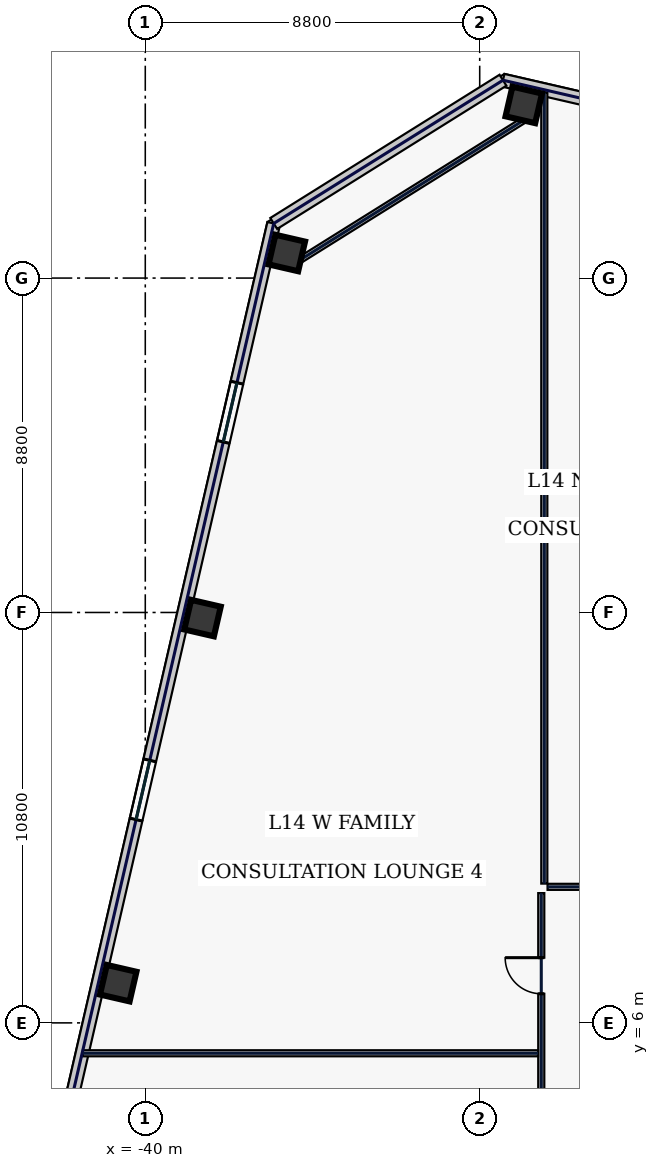
"""IFC4 building model, lengths in metres.
Left out: names, types, materials, properties, quantities, classifications, styles, units other than length and angle.
Written with IfcOpenShell. Run it as: python <this file> out.ifc"""

import sys

from ifc_helpers import new_model, si_unit, direction, frame, frame_2d, origin, origin_2d, place, context, subcontext, project, spatial, rectangle, hollow_rectangle, extrude, element, fill, save


model = new_model("IFC4")
c1 = context("Model", 3, precision=1e-05, world=origin(), true_north=direction((0.0, 1.0)))
c2 = subcontext(c1, "Body", "Model", "MODEL_VIEW")
j1 = project(units=[si_unit("LENGTHUNIT", "METRE"), si_unit("PLANEANGLEUNIT", "RADIAN")], contexts=[c1])
p1 = place(None, origin())
s1 = spatial("IfcSite", under=j1, at=p1, CompositionType="ELEMENT")
p2 = place(p1, origin())
s2 = spatial("IfcBuilding", under=s1, at=p2, CompositionType="ELEMENT")
p3 = place(p2, frame((0.0, 0.0, 67.4)))
s3 = spatial("IfcBuildingStorey", under=s2, at=p3, CompositionType="ELEMENT", Elevation=67.4)
for number, where, z_axis, x_axis in (
    (1, (-30.04, 30.156, 0.0), (0.0, 0.0, 1.0), (0.974, -0.225, 0.0)),
    (2, (-36.276, 26.26, 0.0), (0.0, 0.0, 1.0), (0.974, -0.225, 0.0)),
    (3, (-38.494, 16.652, 0.0), (0.0, 0.0, 1.0), (0.974, -0.225, 0.0)),
    (4, (-40.712, 7.045, 0.0), (0.0, 0.0, 1.0), (0.974, -0.225, 0.0)),
):
    element("IfcColumn", number, at=place(p3, frame(where, z_axis=z_axis, x_axis=x_axis)), inside=s3, PredefinedType="COLUMN", context=c2, shape_type="SweptSolid", body=[
        extrude(hollow_rectangle(XDim=0.8, YDim=0.8, WallThickness=0.036, at=origin_2d()), origin(), (0.0, 0.0, 1.0), 3.74),
    ])
p4 = place(p3, frame((-8.517, 25.711, 0.0), z_axis=(0.0, 0.0, 1.0), x_axis=(-0.974372845456, 0.224939009598, 0.0)))
e5 = element("IfcWall", 5, at=p4, inside=s3, PredefinedType="STANDARD", context=c2, shape_type="SweptSolid", body=[
    extrude(rectangle(XDim=22.652, YDim=0.34, at=frame_2d((11.326, 0.0))), origin(), (0.0, 0.0, 1.0), 3.74),
])
p5 = place(p4, frame((18.189, 0.0, 0.77)))
e6 = element("IfcOpeningElement", 6, at=p5, cuts=e5, PredefinedType="OPENING", context=c2, shape_type="SweptSolid", body=[
    extrude(rectangle(XDim=2.3, YDim=2.1, at=frame_2d((1.15, 1.05))), frame((0.0, 0.18, 0.0), z_axis=(0.0, -1.0, 0.0), x_axis=(1.0, 0.0, 0.0)), (0.0, 0.0, 1.0), 0.36),
])
p6 = place(p4, frame((13.705, 0.0, 0.77)))
e7 = element("IfcOpeningElement", 7, at=p6, cuts=e5, PredefinedType="OPENING", context=c2, shape_type="SweptSolid", body=[
    extrude(rectangle(XDim=0.85, YDim=1.85, at=frame_2d((0.425, 0.925))), frame((0.0, 0.18, 0.0), z_axis=(0.0, -1.0, 0.0), x_axis=(1.0, 0.0, 0.0)), (0.0, 0.0, 1.0), 0.36),
])
p7 = place(p4, frame((5.406, 0.0, 0.77)))
e8 = element("IfcOpeningElement", 8, at=p7, cuts=e5, PredefinedType="OPENING", context=c2, shape_type="SweptSolid", body=[
    extrude(rectangle(XDim=0.85, YDim=1.85, at=frame_2d((0.425, 0.925))), frame((0.0, 0.18, 0.0), z_axis=(0.0, -1.0, 0.0), x_axis=(1.0, 0.0, 0.0)), (0.0, 0.0, 1.0), 0.36),
])
p8 = place(p3, frame((-36.62, 27.037, 0.0), z_axis=(0.0, 0.0, 1.0), x_axis=(-0.224951280646, -0.974370012539, 0.0)))
e9 = element("IfcWall", 9, at=p8, inside=s3, PredefinedType="STANDARD", context=c2, shape_type="SweptSolid", body=[
    extrude(rectangle(XDim=40.8, YDim=0.34, at=frame_2d((20.4, 0.0))), origin(), (0.0, 0.0, 1.0), 3.74),
])
p9 = place(p8, frame((4.3, 0.0, 0.58)))
e10 = element("IfcOpeningElement", 10, at=p9, cuts=e9, PredefinedType="OPENING", context=c2, shape_type="SweptSolid", body=[
    extrude(rectangle(XDim=1.6, YDim=2.3, at=frame_2d((0.8, 1.15))), frame((0.0, 0.18, 0.0), z_axis=(0.0, -1.0, 0.0), x_axis=(1.0, 0.0, 0.0)), (0.0, 0.0, 1.0), 0.36),
])
p10 = place(p8, frame((14.5, 0.0, 0.58)))
e11 = element("IfcOpeningElement", 11, at=p10, cuts=e9, PredefinedType="OPENING", context=c2, shape_type="SweptSolid", body=[
    extrude(rectangle(XDim=1.6, YDim=2.3, at=frame_2d((0.8, 1.15))), frame((0.0, 0.18, 0.0), z_axis=(0.0, -1.0, 0.0), x_axis=(1.0, 0.0, 0.0)), (0.0, 0.0, 1.0), 0.36),
])
p11 = place(p8, frame((24.35, 0.0, 0.75)))
e12 = element("IfcOpeningElement", 12, at=p11, cuts=e9, PredefinedType="OPENING", context=c2, shape_type="SweptSolid", body=[
    extrude(rectangle(XDim=0.85, YDim=1.85, at=frame_2d((0.425, 0.925))), frame((0.0, 0.18, 0.0), z_axis=(0.0, -1.0, 0.0), x_axis=(1.0, 0.0, 0.0)), (0.0, 0.0, 1.0), 0.36),
])
p12 = place(p8, frame((34.9, 0.0, 0.58)))
e13 = element("IfcOpeningElement", 13, at=p12, cuts=e9, PredefinedType="OPENING", context=c2, shape_type="SweptSolid", body=[
    extrude(rectangle(XDim=1.6, YDim=2.3, at=frame_2d((0.8, 1.15))), frame((0.0, 0.18, 0.0), z_axis=(0.0, -1.0, 0.0), x_axis=(1.0, 0.0, 0.0)), (0.0, 0.0, 1.0), 0.36),
])
p13 = place(p3, frame((-30.588, 30.807, 0.0), z_axis=(0.0, 0.0, 1.0), x_axis=(-0.848031080615, -0.529946493819, 0.0)))
e14 = element("IfcWall", 14, at=p13, inside=s3, PredefinedType="STANDARD", context=c2, shape_type="SweptSolid", body=[
    extrude(rectangle(XDim=7.114, YDim=0.34, at=frame_2d((3.557, 0.0))), origin(), (0.0, 0.0, 1.0), 3.74),
])
p14 = place(p3, frame((-29.86, 29.868, 0.0), z_axis=(0.0, 0.0, 1.0), x_axis=(-0.848043064089, -0.529927317139, 0.0)))
e15 = element("IfcWall", 15, at=p14, inside=s3, PredefinedType="PARTITIONING", context=c2, shape_type="SweptSolid", body=[
    extrude(rectangle(XDim=7.354, YDim=0.16, at=frame_2d((3.677, 0.0))), origin(), (0.0, 0.0, 1.0), 3.74),
])
p15 = place(p3, frame((-29.58, -9.215, 0.0), z_axis=(0.0, 0.0, 1.0), x_axis=(0.0, 1.0, 0.0)))
e16 = element("IfcWall", 16, at=p15, inside=s3, PredefinedType="PARTITIONING", context=c2, shape_type="SweptSolid", body=[
    extrude(rectangle(XDim=18.63, YDim=0.16, at=frame_2d((9.315, 0.0))), origin(), (0.0, 0.0, 1.0), 3.74),
])
p16 = place(p15, frame((1.769, 0.0, 0.0)))
e17 = element("IfcOpeningElement", 17, at=p16, cuts=e16, PredefinedType="OPENING", context=c2, shape_type="SweptSolid", body=[
    extrude(rectangle(XDim=0.95, YDim=2.2, at=frame_2d((0.475, 1.1))), frame((0.0, 0.09, 0.0), z_axis=(0.0, -1.0, 0.0), x_axis=(1.0, 0.0, 0.0)), (0.0, 0.0, 1.0), 0.18),
])
p17 = place(p15, frame((6.85, 0.0, 0.0)))
e18 = element("IfcOpeningElement", 18, at=p17, cuts=e16, PredefinedType="OPENING", context=c2, shape_type="SweptSolid", body=[
    extrude(rectangle(XDim=0.95, YDim=2.2, at=frame_2d((0.475, 1.1))), frame((0.0, 0.09, 0.0), z_axis=(0.0, -1.0, 0.0), x_axis=(1.0, 0.0, 0.0)), (0.0, 0.0, 1.0), 0.18),
])
p18 = place(p15, frame((12.05, 0.0, 0.0)))
e19 = element("IfcOpeningElement", 19, at=p18, cuts=e16, PredefinedType="OPENING", context=c2, shape_type="SweptSolid", body=[
    extrude(rectangle(XDim=0.95, YDim=2.2, at=frame_2d((0.475, 1.1))), frame((0.0, 0.09, 0.0), z_axis=(0.0, -1.0, 0.0), x_axis=(1.0, 0.0, 0.0)), (0.0, 0.0, 1.0), 0.18),
])
p19 = place(p15, frame((15.981, 0.0, 0.0)))
e20 = element("IfcOpeningElement", 20, at=p19, cuts=e16, PredefinedType="OPENING", context=c2, shape_type="SweptSolid", body=[
    extrude(rectangle(XDim=0.95, YDim=2.2, at=frame_2d((0.475, 1.1))), frame((0.0, 0.09, 0.0), z_axis=(0.0, -1.0, 0.0), x_axis=(1.0, 0.0, 0.0)), (0.0, 0.0, 1.0), 0.18),
])
p20 = place(p3, frame((-29.415, 9.58, 0.0), z_axis=(0.0, 0.0, 1.0), x_axis=(1.0, 0.0, 0.0)))
e21 = element("IfcWall", 21, at=p20, inside=s3, PredefinedType="PARTITIONING", context=c2, shape_type="SweptSolid", body=[
    extrude(rectangle(XDim=43.65, YDim=0.16, at=frame_2d((21.825, 0.0))), origin(), (0.0, 0.0, 1.0), 3.74),
])
p21 = place(p20, frame((2.469, 0.0, 0.0)))
e22 = element("IfcOpeningElement", 22, at=p21, cuts=e21, PredefinedType="OPENING", context=c2, shape_type="SweptSolid", body=[
    extrude(rectangle(XDim=1.05, YDim=2.2, at=frame_2d((0.525, 1.1))), frame((0.0, 0.09, 0.0), z_axis=(0.0, -1.0, 0.0), x_axis=(1.0, 0.0, 0.0)), (0.0, 0.0, 1.0), 0.18),
])
p22 = place(p20, frame((8.2, 0.0, 0.0)))
e23 = element("IfcOpeningElement", 23, at=p22, cuts=e21, PredefinedType="OPENING", context=c2, shape_type="SweptSolid", body=[
    extrude(rectangle(XDim=0.95, YDim=2.2, at=frame_2d((0.475, 1.1))), frame((0.0, 0.09, 0.0), z_axis=(0.0, -1.0, 0.0), x_axis=(1.0, 0.0, 0.0)), (0.0, 0.0, 1.0), 0.18),
])
p23 = place(p20, frame((14.1, 0.0, 0.0)))
e24 = element("IfcOpeningElement", 24, at=p23, cuts=e21, PredefinedType="OPENING", context=c2, shape_type="SweptSolid", body=[
    extrude(rectangle(XDim=0.95, YDim=2.2, at=frame_2d((0.475, 1.1))), frame((0.0, 0.09, 0.0), z_axis=(0.0, -1.0, 0.0), x_axis=(1.0, 0.0, 0.0)), (0.0, 0.0, 1.0), 0.18),
])
p24 = place(p20, frame((20.275, 0.0, 0.0)))
e25 = element("IfcOpeningElement", 25, at=p24, cuts=e21, PredefinedType="OPENING", context=c2, shape_type="SweptSolid", body=[
    extrude(rectangle(XDim=1.3, YDim=2.2, at=frame_2d((0.65, 1.1))), frame((0.0, 0.09, 0.0), z_axis=(0.0, -1.0, 0.0), x_axis=(1.0, 0.0, 0.0)), (0.0, 0.0, 1.0), 0.18),
])
p25 = place(p20, frame((27.075, 0.0, 0.0)))
e26 = element("IfcOpeningElement", 26, at=p25, cuts=e21, PredefinedType="OPENING", context=c2, shape_type="SweptSolid", body=[
    extrude(rectangle(XDim=1.3, YDim=2.2, at=frame_2d((0.65, 1.1))), frame((0.0, 0.09, 0.0), z_axis=(0.0, -1.0, 0.0), x_axis=(1.0, 0.0, 0.0)), (0.0, 0.0, 1.0), 0.18),
])
p26 = place(p20, frame((34.906, 0.0, 0.0)))
e27 = element("IfcOpeningElement", 27, at=p26, cuts=e21, PredefinedType="OPENING", context=c2, shape_type="SweptSolid", body=[
    extrude(rectangle(XDim=1.45, YDim=2.2, at=frame_2d((0.725, 1.1))), frame((0.0, 0.09, 0.0), z_axis=(0.0, -1.0, 0.0), x_axis=(1.0, 0.0, 0.0)), (0.0, 0.0, 1.0), 0.18),
])
p27 = place(p3, frame((-29.5, 9.665, 0.0), z_axis=(0.0, 0.0, 1.0), x_axis=(0.0, 1.0, 0.0)))
e28 = element("IfcWall", 28, at=p27, inside=s3, PredefinedType="PARTITIONING", context=c2, shape_type="SweptSolid", body=[
    extrude(rectangle(XDim=20.819, YDim=0.16, at=frame_2d((10.409, 0.0))), origin(), (0.0, 0.0, 1.0), 3.74),
])
p28 = place(p3, frame((-41.641, 5.2, 0.0), z_axis=(0.0, 0.0, 1.0), x_axis=(1.0, 0.0, 0.0)))
e29 = element("IfcWall", 29, at=p28, inside=s3, PredefinedType="PARTITIONING", context=c2, shape_type="SweptSolid", body=[
    extrude(rectangle(XDim=11.976, YDim=0.16, at=frame_2d((5.988, 0.0))), origin(), (0.0, 0.0, 1.0), 3.74),
])
p29 = place(p9, origin())
e30 = element("IfcWindow", 30, at=p29, inside=s3, PartitioningType="SINGLE_PANEL", PredefinedType="WINDOW", context=c2, shape_type="SweptSolid", body=[
    extrude(rectangle(XDim=1.6, YDim=2.3, at=frame_2d((0.8, 1.15))), frame((0.0, 0.03, 0.0), z_axis=(0.0, -1.0, 0.0), x_axis=(1.0, 0.0, 0.0)), (0.0, 0.0, 1.0), 0.06),
])
fill(e10, e30)
p30 = place(p10, origin())
e31 = element("IfcWindow", 31, at=p30, inside=s3, PartitioningType="SINGLE_PANEL", PredefinedType="WINDOW", context=c2, shape_type="SweptSolid", body=[
    extrude(rectangle(XDim=1.6, YDim=2.3, at=frame_2d((0.8, 1.15))), frame((0.0, 0.03, 0.0), z_axis=(0.0, -1.0, 0.0), x_axis=(1.0, 0.0, 0.0)), (0.0, 0.0, 1.0), 0.06),
])
fill(e11, e31)
p31 = place(p19, origin())
e32 = element("IfcDoor", 32, at=p31, inside=s3, OperationType="SINGLE_SWING_RIGHT", PredefinedType="DOOR", context=c2, shape_type="SweptSolid", body=[
    extrude(rectangle(XDim=0.95, YDim=2.2, at=frame_2d((0.475, 1.1))), frame((0.0, 0.025, 0.0), z_axis=(0.0, -1.0, 0.0), x_axis=(1.0, 0.0, 0.0)), (0.0, 0.0, 1.0), 0.05),
])
fill(e20, e32)
save(model, sys.argv[1])
